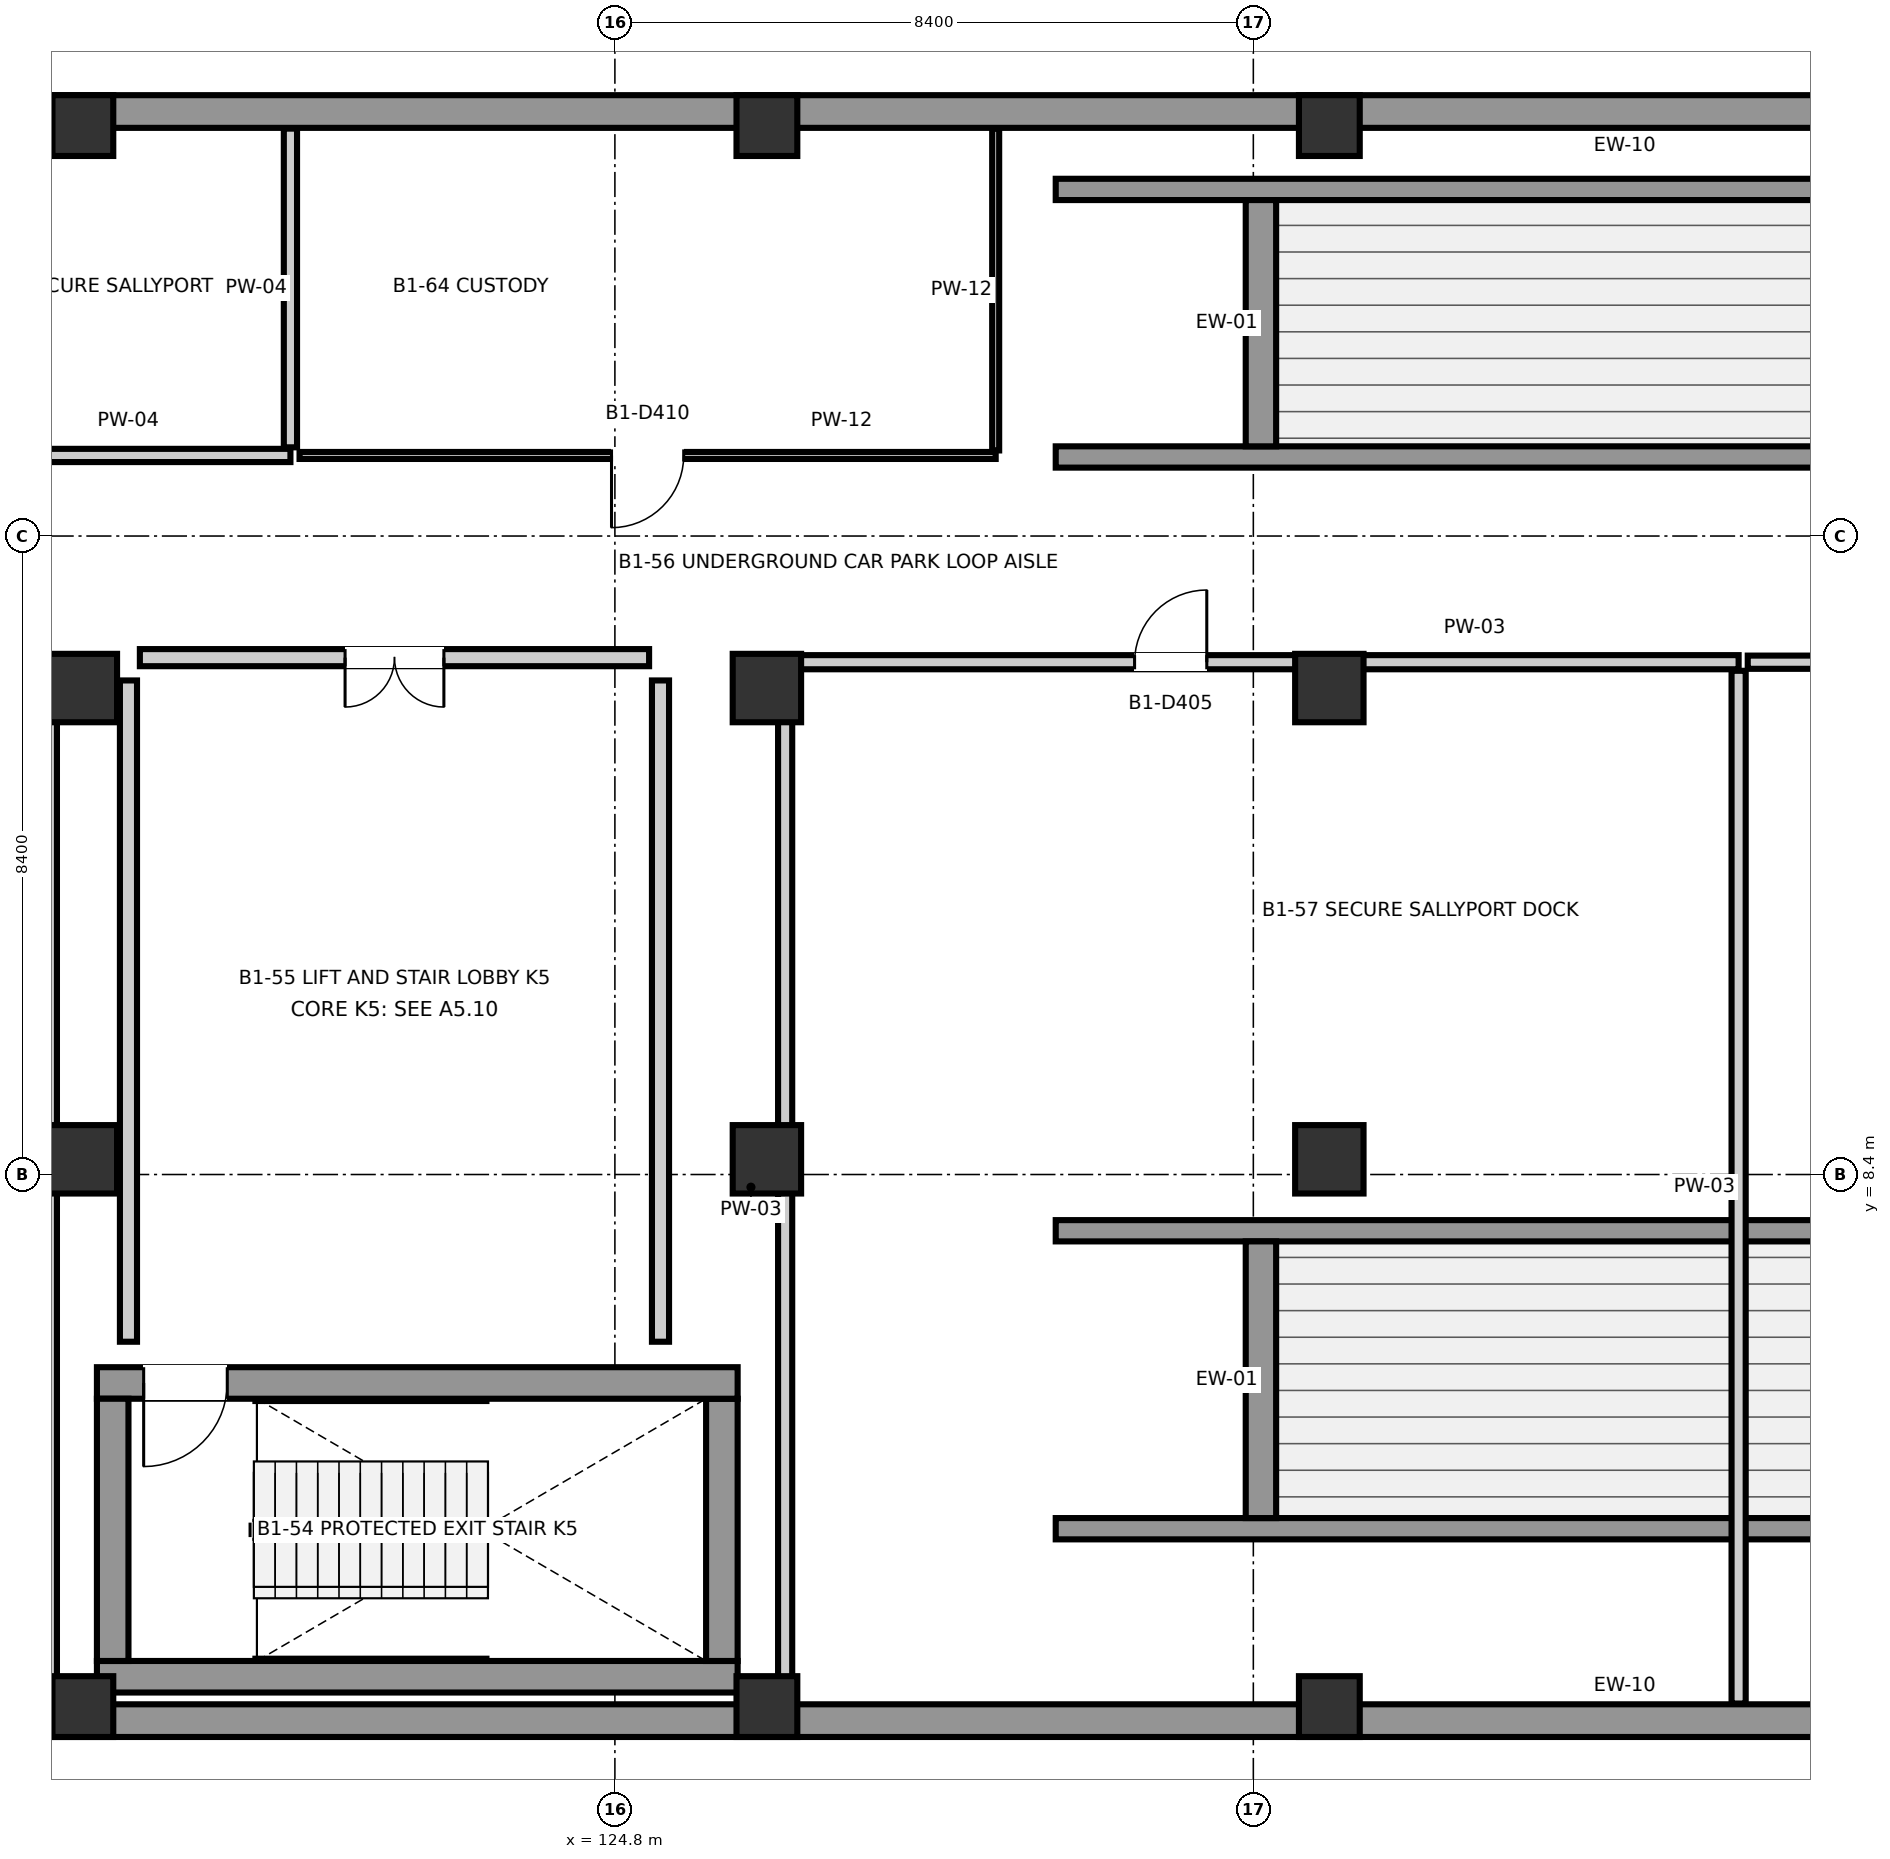
"""IFC4 building model, lengths in metres.
Left out: names, types, materials, properties, quantities, classifications, styles, units other than length and angle.
Written with IfcOpenShell. Run it as: python <this file> out.ifc"""

import sys

from ifc_helpers import new_model, si_unit, direction, frame, frame_2d, origin, origin_2d, place, context, subcontext, project, spatial, rectangle, extrude, element, fill, save


model = new_model("IFC4")
c1 = context("Model", 3, precision=1e-05, world=origin(), true_north=direction((0.0, 1.0)))
c2 = subcontext(c1, "Body", "Model", "MODEL_VIEW")
j1 = project(units=[si_unit("LENGTHUNIT", "METRE"), si_unit("PLANEANGLEUNIT", "RADIAN")], contexts=[c1])
p1 = place(None, origin())
s1 = spatial("IfcSite", under=j1, at=p1, CompositionType="ELEMENT")
p2 = place(p1, origin())
s2 = spatial("IfcBuilding", under=s1, at=p2, CompositionType="ELEMENT")
p3 = place(p2, frame((0.0, 0.0, -4.2)))
s3 = spatial("IfcBuildingStorey", under=s2, at=p3, CompositionType="ELEMENT", Elevation=-4.2)
p4 = place(p3, frame((117.8, 1.4, 0.0), z_axis=(0.0, 0.0, 1.0), x_axis=(1.0, 0.0, 0.0)))
e1 = element("IfcColumn", 1, at=p4, inside=s3, PredefinedType="COLUMN", context=c2, shape_type="SweptSolid", body=[
    extrude(rectangle(XDim=0.8, YDim=0.8, at=origin_2d()), origin(), (0.0, 0.0, 1.0), 4.2),
])
for number, where, z_axis, x_axis in (
    (2, (117.8, 8.6, 0.0), (0.0, 0.0, 1.0), (1.0, 0.0, 0.0)),
    (3, (117.8, 14.8, 0.0), (0.0, 0.0, 1.0), (1.0, 0.0, 0.0)),
):
    element("IfcColumn", number, at=place(p3, frame(where, z_axis=z_axis, x_axis=x_axis)), inside=s3, PredefinedType="COLUMN", context=c2, shape_type="SweptSolid", body=[
        extrude(rectangle(XDim=0.9, YDim=0.9, at=origin_2d()), origin(), (0.0, 0.0, 1.0), 4.2),
    ])
for number, where, z_axis, x_axis in (
    (4, (117.8, 22.2, 0.0), (0.0, 0.0, 1.0), (1.0, 0.0, 0.0)),
    (5, (126.8, 1.4, 0.0), (0.0, 0.0, 1.0), (1.0, 0.0, 0.0)),
):
    element("IfcColumn", number, at=place(p3, frame(where, z_axis=z_axis, x_axis=x_axis)), inside=s3, PredefinedType="COLUMN", context=c2, shape_type="SweptSolid", body=[
        extrude(rectangle(XDim=0.8, YDim=0.8, at=origin_2d()), origin(), (0.0, 0.0, 1.0), 4.2),
    ])
for number, where, z_axis, x_axis in (
    (6, (126.8, 8.6, 0.0), (0.0, 0.0, 1.0), (1.0, 0.0, 0.0)),
    (7, (126.8, 14.8, 0.0), (0.0, 0.0, 1.0), (1.0, 0.0, 0.0)),
):
    element("IfcColumn", number, at=place(p3, frame(where, z_axis=z_axis, x_axis=x_axis)), inside=s3, PredefinedType="COLUMN", context=c2, shape_type="SweptSolid", body=[
        extrude(rectangle(XDim=0.9, YDim=0.9, at=origin_2d()), origin(), (0.0, 0.0, 1.0), 4.2),
    ])
for number, where, z_axis, x_axis in (
    (8, (126.8, 22.2, 0.0), (0.0, 0.0, 1.0), (1.0, 0.0, 0.0)),
    (9, (134.2, 1.4, 0.0), (0.0, 0.0, 1.0), (1.0, 0.0, 0.0)),
):
    element("IfcColumn", number, at=place(p3, frame(where, z_axis=z_axis, x_axis=x_axis)), inside=s3, PredefinedType="COLUMN", context=c2, shape_type="SweptSolid", body=[
        extrude(rectangle(XDim=0.8, YDim=0.8, at=origin_2d()), origin(), (0.0, 0.0, 1.0), 4.2),
    ])
for number, where, z_axis, x_axis in (
    (10, (134.2, 8.6, 0.0), (0.0, 0.0, 1.0), (1.0, 0.0, 0.0)),
    (11, (134.2, 14.8, 0.0), (0.0, 0.0, 1.0), (1.0, 0.0, 0.0)),
):
    element("IfcColumn", number, at=place(p3, frame(where, z_axis=z_axis, x_axis=x_axis)), inside=s3, PredefinedType="COLUMN", context=c2, shape_type="SweptSolid", body=[
        extrude(rectangle(XDim=0.9, YDim=0.9, at=origin_2d()), origin(), (0.0, 0.0, 1.0), 4.2),
    ])
p5 = place(p3, frame((134.2, 22.2, 0.0), z_axis=(0.0, 0.0, 1.0), x_axis=(1.0, 0.0, 0.0)))
e12 = element("IfcColumn", 12, at=p5, inside=s3, PredefinedType="COLUMN", context=c2, shape_type="SweptSolid", body=[
    extrude(rectangle(XDim=0.8, YDim=0.8, at=origin_2d()), origin(), (0.0, 0.0, 1.0), 4.2),
])
for number, where, z_axis, x_axis in (
    (13, (101.845, 1.215, 0.0), (0.0, 0.0, 1.0), (1.0, 0.0, 0.0)),
    (14, (165.575, 22.385, 0.0), (0.0, 0.0, 1.0), (-1.0, 0.0, 0.0)),
):
    element("IfcWall", number, at=place(p3, frame(where, z_axis=z_axis, x_axis=x_axis)), inside=s3, PredefinedType="SOLIDWALL", context=c2, shape_type="SweptSolid", body=[
        extrude(rectangle(XDim=63.73, YDim=0.43, at=frame_2d((31.865, 0.0))), origin(), (0.0, 0.0, 1.0), 4.2),
    ])
p6 = place(p3, frame((117.985, 1.792, 0.0), z_axis=(0.0, 0.0, 1.0), x_axis=(1.0, 0.0, 0.0)))
e15 = element("IfcWall", 15, at=p6, inside=s3, PredefinedType="SHEAR", context=c2, shape_type="SweptSolid", body=[
    extrude(rectangle(XDim=8.43, YDim=0.415, at=frame_2d((4.215, 0.0))), origin(), (0.0, 0.0, 1.0), 4.2),
])
p7 = place(p3, frame((126.208, 2.0, 0.0), z_axis=(0.0, 0.0, 1.0), x_axis=(0.0, 1.0, 0.0)))
e16 = element("IfcWall", 16, at=p7, inside=s3, PredefinedType="SHEAR", context=c2, shape_type="SweptSolid", body=[
    extrude(rectangle(XDim=3.45, YDim=0.415, at=frame_2d((1.725, 0.0))), origin(), (0.0, 0.0, 1.0), 4.2),
])
p8 = place(p3, frame((126.415, 5.657, 0.0), z_axis=(0.0, 0.0, 1.0), x_axis=(-1.0, 0.0, 0.0)))
e17 = element("IfcWall", 17, at=p8, inside=s3, PredefinedType="SHEAR", context=c2, shape_type="SweptSolid", body=[
    extrude(rectangle(XDim=8.43, YDim=0.415, at=frame_2d((4.215, 0.0))), origin(), (0.0, 0.0, 1.0), 4.2),
])
p9 = place(p8, frame((6.715, 0.0, 0.0)))
e18 = element("IfcOpeningElement", 18, at=p9, cuts=e17, PredefinedType="OPENING", context=c2, shape_type="SweptSolid", body=[
    extrude(rectangle(XDim=1.1, YDim=2.15, at=frame_2d((0.55, 1.075))), frame((0.0, 0.222, 0.0), z_axis=(0.0, -1.0, 0.0), x_axis=(1.0, 0.0, 0.0)), (0.0, 0.0, 1.0), 0.445),
])
p10 = place(p3, frame((118.192, 5.45, 0.0), z_axis=(0.0, 0.0, 1.0), x_axis=(0.0, -1.0, 0.0)))
e19 = element("IfcWall", 19, at=p10, inside=s3, PredefinedType="SHEAR", context=c2, shape_type="SweptSolid", body=[
    extrude(rectangle(XDim=3.45, YDim=0.415, at=frame_2d((1.725, 0.0))), origin(), (0.0, 0.0, 1.0), 4.2),
])
p11 = place(p3, frame((118.55, 15.2, 0.0), z_axis=(0.0, 0.0, 1.0), x_axis=(1.0, 0.0, 0.0)))
e20 = element("IfcWall", 20, at=p11, inside=s3, PredefinedType="PARTITIONING", context=c2, shape_type="SweptSolid", body=[
    extrude(rectangle(XDim=6.7, YDim=0.225, at=frame_2d((3.35, 0.0))), origin(), (0.0, 0.0, 1.0), 2.99),
])
p12 = place(p11, frame((2.7, 0.0, 0.0)))
e21 = element("IfcOpeningElement", 21, at=p12, cuts=e20, PredefinedType="OPENING", context=c2, shape_type="SweptSolid", body=[
    extrude(rectangle(XDim=1.3, YDim=2.15, at=frame_2d((0.65, 1.075))), frame((0.0, 0.127, 0.0), z_axis=(0.0, -1.0, 0.0), x_axis=(1.0, 0.0, 0.0)), (0.0, 0.0, 1.0), 0.255),
])
for number, where, z_axis, x_axis in (
    (22, (118.4, 6.2, 0.0), (0.0, 0.0, 1.0), (0.0, 1.0, 0.0)),
    (23, (125.4, 6.2, 0.0), (0.0, 0.0, 1.0), (0.0, 1.0, 0.0)),
):
    element("IfcWall", number, at=place(p3, frame(where, z_axis=z_axis, x_axis=x_axis)), inside=s3, PredefinedType="PARTITIONING", context=c2, shape_type="SweptSolid", body=[
        extrude(rectangle(XDim=8.7, YDim=0.225, at=frame_2d((4.35, 0.0))), origin(), (0.0, 0.0, 1.0), 3.86),
    ])
for number, where, z_axis, x_axis in (
    (24, (130.6, 17.84, 0.0), (0.0, 0.0, 1.0), (1.0, 0.0, 0.0)),
    (25, (130.6, 21.36, 0.0), (0.0, 0.0, 1.0), (1.0, 0.0, 0.0)),
):
    element("IfcWall", number, at=place(p3, frame(where, z_axis=z_axis, x_axis=x_axis)), inside=s3, PredefinedType="SOLIDWALL", context=c2, shape_type="SweptSolid", body=[
        extrude(rectangle(XDim=34.9, YDim=0.28, at=frame_2d((17.45, 0.0))), origin(), (0.0, 0.0, 1.0), 4.2),
    ])
p13 = place(p3, frame((133.3, 17.98, 0.0), z_axis=(0.0, 0.0, 1.0), x_axis=(0.0, 1.0, 0.0)))
e26 = element("IfcWall", 26, at=p13, inside=s3, PredefinedType="SOLIDWALL", context=c2, shape_type="SweptSolid", body=[
    extrude(rectangle(XDim=3.24, YDim=0.4, at=frame_2d((1.62, 0.0))), origin(), (0.0, 0.0, 1.0), 0.02),
])
for number, where, z_axis, x_axis in (
    (27, (130.6, 3.74, 0.0), (0.0, 0.0, 1.0), (1.0, 0.0, 0.0)),
    (28, (130.6, 7.66, 0.0), (0.0, 0.0, 1.0), (1.0, 0.0, 0.0)),
):
    element("IfcWall", number, at=place(p3, frame(where, z_axis=z_axis, x_axis=x_axis)), inside=s3, PredefinedType="SOLIDWALL", context=c2, shape_type="SweptSolid", body=[
        extrude(rectangle(XDim=34.9, YDim=0.28, at=frame_2d((17.45, 0.0))), origin(), (0.0, 0.0, 1.0), 4.2),
    ])
p14 = place(p3, frame((133.3, 3.88, 0.0), z_axis=(0.0, 0.0, 1.0), x_axis=(0.0, 1.0, 0.0)))
e29 = element("IfcWall", 29, at=p14, inside=s3, PredefinedType="SOLIDWALL", context=c2, shape_type="SweptSolid", body=[
    extrude(rectangle(XDim=3.64, YDim=0.4, at=frame_2d((1.82, 0.0))), origin(), (0.0, 0.0, 1.0), 0.02),
])
p15 = place(p3, frame((127.04, 15.14, 0.0), z_axis=(0.0, 0.0, 1.0), x_axis=(1.0, 0.0, 0.0)))
e30 = element("IfcWall", 30, at=p15, inside=s3, PredefinedType="PARTITIONING", context=c2, shape_type="SweptSolid", body=[
    extrude(rectangle(XDim=12.545, YDim=0.186, at=frame_2d((6.272, 0.0))), origin(), (0.0, 0.0, 1.0), 3.24),
])
p16 = place(p15, frame((4.597, 0.0, 0.0)))
e31 = element("IfcOpeningElement", 31, at=p16, cuts=e30, PredefinedType="OPENING", context=c2, shape_type="SweptSolid", body=[
    extrude(rectangle(XDim=0.95, YDim=2.12, at=frame_2d((0.475, 1.06))), frame((0.0, 0.108, 0.0), z_axis=(0.0, -1.0, 0.0), x_axis=(1.0, 0.0, 0.0)), (0.0, 0.0, 1.0), 0.216),
])
p17 = place(p3, frame((127.04, 1.44, 0.0), z_axis=(0.0, 0.0, 1.0), x_axis=(0.0, 1.0, 0.0)))
e32 = element("IfcWall", 32, at=p17, inside=s3, PredefinedType="PARTITIONING", context=c2, shape_type="SweptSolid", body=[
    extrude(rectangle(XDim=13.587, YDim=0.186, at=frame_2d((6.793, 0.0))), origin(), (0.0, 0.0, 1.0), 3.09),
])
p18 = place(p3, frame((139.585, 1.44, 0.0), z_axis=(0.0, 0.0, 1.0), x_axis=(0.0, 1.0, 0.0)))
e33 = element("IfcWall", 33, at=p18, inside=s3, PredefinedType="PARTITIONING", context=c2, shape_type="SweptSolid", body=[
    extrude(rectangle(XDim=13.587, YDim=0.186, at=frame_2d((6.793, 0.0))), origin(), (0.0, 0.0, 1.0), 3.86),
])
p19 = place(p3, frame((139.705, 15.14, 0.0), z_axis=(0.0, 0.0, 1.0), x_axis=(1.0, 0.0, 0.0)))
e34 = element("IfcWall", 34, at=p19, inside=s3, PredefinedType="PARTITIONING", context=c2, shape_type="SweptSolid", body=[
    extrude(rectangle(XDim=13.112, YDim=0.174, at=frame_2d((6.556, 0.0))), origin(), (0.0, 0.0, 1.0), 3.09),
])
p20 = place(p19, frame((6.081, 0.0, 0.0)))
e35 = element("IfcOpeningElement", 35, at=p20, cuts=e34, PredefinedType="OPENING", context=c2, shape_type="SweptSolid", body=[
    extrude(rectangle(XDim=0.95, YDim=2.12, at=frame_2d((0.475, 1.06))), frame((0.0, 0.102, 0.0), z_axis=(0.0, -1.0, 0.0), x_axis=(1.0, 0.0, 0.0)), (0.0, 0.0, 1.0), 0.204),
])
p21 = place(p3, frame((117.36, 1.44, 0.0), z_axis=(0.0, 0.0, 1.0), x_axis=(0.0, 1.0, 0.0)))
e36 = element("IfcWall", 36, at=p21, inside=s3, PredefinedType="PARTITIONING", context=c2, shape_type="SweptSolid", body=[
    extrude(rectangle(XDim=13.581, YDim=0.198, at=frame_2d((6.791, 0.0))), origin(), (0.0, 0.0, 1.0), 3.86),
])
p22 = place(p3, frame((110.942, 17.86, 0.0), z_axis=(0.0, 0.0, 1.0), x_axis=(1.0, 0.0, 0.0)))
e37 = element("IfcWall", 37, at=p22, inside=s3, PredefinedType="PARTITIONING", context=c2, shape_type="SweptSolid", body=[
    extrude(rectangle(XDim=9.589, YDim=0.174, at=frame_2d((4.794, 0.0))), origin(), (0.0, 0.0, 1.0), 3.86),
])
p23 = place(p22, frame((4.32, 0.0, 0.0)))
e38 = element("IfcOpeningElement", 38, at=p23, cuts=e37, PredefinedType="OPENING", context=c2, shape_type="SweptSolid", body=[
    extrude(rectangle(XDim=0.95, YDim=2.12, at=frame_2d((0.475, 1.06))), frame((0.0, 0.102, 0.0), z_axis=(0.0, -1.0, 0.0), x_axis=(1.0, 0.0, 0.0)), (0.0, 0.0, 1.0), 0.204),
])
p24 = place(p3, frame((120.531, 17.967, 0.0), z_axis=(0.0, 0.0, 1.0), x_axis=(0.0, 1.0, 0.0)))
e39 = element("IfcWall", 39, at=p24, inside=s3, PredefinedType="PARTITIONING", context=c2, shape_type="SweptSolid", body=[
    extrude(rectangle(XDim=4.193, YDim=0.174, at=frame_2d((2.096, 0.0))), origin(), (0.0, 0.0, 1.0), 3.86),
])
p25 = place(p3, frame((120.651, 17.86, 0.0), z_axis=(0.0, 0.0, 1.0), x_axis=(1.0, 0.0, 0.0)))
e40 = element("IfcWall", 40, at=p25, inside=s3, PredefinedType="PARTITIONING", context=c2, shape_type="SweptSolid", body=[
    extrude(rectangle(XDim=9.159, YDim=0.092, at=frame_2d((4.58, 0.0))), origin(), (0.0, 0.0, 1.0), 3.86),
])
p26 = place(p25, frame((4.104, 0.0, 0.0)))
e41 = element("IfcOpeningElement", 41, at=p26, cuts=e40, PredefinedType="OPENING", context=c2, shape_type="SweptSolid", body=[
    extrude(rectangle(XDim=0.95, YDim=2.12, at=frame_2d((0.475, 1.06))), frame((0.0, 0.061, 0.0), z_axis=(0.0, -1.0, 0.0), x_axis=(1.0, 0.0, 0.0)), (0.0, 0.0, 1.0), 0.122),
])
p27 = place(p3, frame((129.81, 17.926, 0.0), z_axis=(0.0, 0.0, 1.0), x_axis=(0.0, 1.0, 0.0)))
e42 = element("IfcWall", 42, at=p27, inside=s3, PredefinedType="PARTITIONING", context=c2, shape_type="SweptSolid", body=[
    extrude(rectangle(XDim=4.234, YDim=0.092, at=frame_2d((2.117, 0.0))), origin(), (0.0, 0.0, 1.0), 3.86),
])
p28 = place(p9, frame((1.1, 0.0, 0.0), z_axis=(0.0, 0.0, 1.0), x_axis=(-1.0, 0.0, 0.0)))
e43 = element("IfcDoor", 43, at=p28, inside=s3, OperationType="SINGLE_SWING_RIGHT", PredefinedType="DOOR", context=c2, shape_type="SweptSolid", body=[
    extrude(rectangle(XDim=1.1, YDim=2.15, at=frame_2d((0.55, 1.075))), frame((0.0, 0.025, 0.0), z_axis=(0.0, -1.0, 0.0), x_axis=(1.0, 0.0, 0.0)), (0.0, 0.0, 1.0), 0.05),
])
fill(e18, e43)
p29 = place(p12, origin())
e44 = element("IfcDoor", 44, at=p29, inside=s3, OperationType="DOUBLE_DOOR_SINGLE_SWING", PredefinedType="DOOR", context=c2, shape_type="SweptSolid", body=[
    extrude(rectangle(XDim=1.3, YDim=2.15, at=frame_2d((0.65, 1.075))), frame((0.0, 0.025, 0.0), z_axis=(0.0, -1.0, 0.0), x_axis=(1.0, 0.0, 0.0)), (0.0, 0.0, 1.0), 0.05),
])
fill(e21, e44)
p30 = place(p16, frame((0.95, 0.0, 0.0), z_axis=(0.0, 0.0, 1.0), x_axis=(-1.0, 0.0, 0.0)))
e45 = element("IfcDoor", 45, at=p30, inside=s3, OperationType="SINGLE_SWING_RIGHT", PredefinedType="DOOR", context=c2, shape_type="SweptSolid", body=[
    extrude(rectangle(XDim=0.95, YDim=2.12, at=frame_2d((0.475, 1.06))), frame((0.0, 0.025, 0.0), z_axis=(0.0, -1.0, 0.0), x_axis=(1.0, 0.0, 0.0)), (0.0, 0.0, 1.0), 0.05),
])
fill(e31, e45)
p31 = place(p26, origin())
e46 = element("IfcDoor", 46, at=p31, inside=s3, OperationType="SINGLE_SWING_LEFT", PredefinedType="DOOR", context=c2, shape_type="SweptSolid", body=[
    extrude(rectangle(XDim=0.95, YDim=2.12, at=frame_2d((0.475, 1.06))), frame((0.0, 0.025, 0.0), z_axis=(0.0, -1.0, 0.0), x_axis=(1.0, 0.0, 0.0)), (0.0, 0.0, 1.0), 0.05),
])
fill(e41, e46)
save(model, sys.argv[1])
